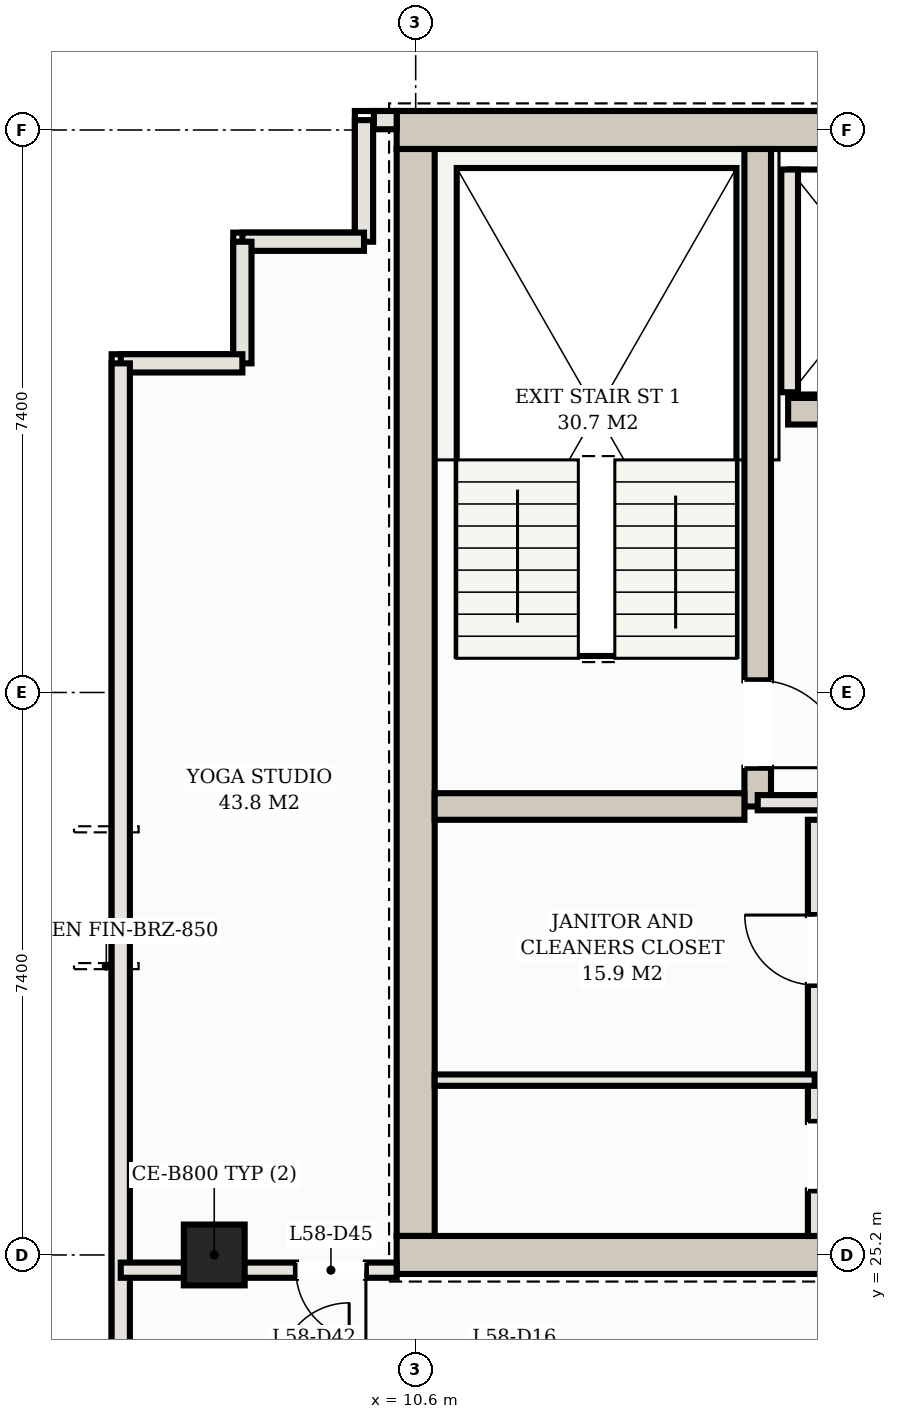
"""IFC4 building model, lengths in metres.
Left out: names, types, materials, properties, quantities, classifications, styles, units other than length and angle.
Written with IfcOpenShell. Run it as: python <this file> out.ifc"""

import sys

from ifc_helpers import new_model, si_unit, direction, frame, frame_2d, origin, origin_2d, place, context, subcontext, project, spatial, rectangle, hollow_rectangle, extrude, element, fill, save


model = new_model("IFC4")
c1 = context("Model", 3, precision=1e-05, world=origin(), true_north=direction((0.0, 1.0)))
c2 = subcontext(c1, "Body", "Model", "MODEL_VIEW")
j1 = project(units=[si_unit("LENGTHUNIT", "METRE"), si_unit("PLANEANGLEUNIT", "RADIAN")], contexts=[c1])
p1 = place(None, origin())
s1 = spatial("IfcSite", under=j1, at=p1, CompositionType="ELEMENT")
p2 = place(p1, origin())
s2 = spatial("IfcBuilding", under=s1, at=p2, CompositionType="ELEMENT")
p3 = place(p2, frame((0.0, 0.0, 213.2)))
s3 = spatial("IfcBuildingStorey", under=s2, at=p3, CompositionType="ELEMENT", Elevation=213.2)
p4 = place(p3, frame((10.35, 40.0, 0.0), z_axis=(0.0, 0.0, 1.0), x_axis=(1.0, 0.0, 0.0)))
e1 = element("IfcWall", 1, at=p4, inside=s3, PredefinedType="SHEAR", context=c2, shape_type="SweptSolid", body=[
    extrude(rectangle(XDim=32.3, YDim=0.5, at=frame_2d((16.15, 0.0))), origin(), (0.0, 0.0, 1.0), 3.11),
])
p5 = place(p3, frame((10.6, 25.45, 0.0), z_axis=(0.0, 0.0, 1.0), x_axis=(0.0, 1.0, 0.0)))
e2 = element("IfcWall", 2, at=p5, inside=s3, PredefinedType="SHEAR", context=c2, shape_type="SweptSolid", body=[
    extrude(rectangle(XDim=14.3, YDim=0.5, at=frame_2d((7.15, 0.0))), origin(), (0.0, 0.0, 1.0), 3.11),
])
p6 = place(p3, frame((10.35, 25.2, 0.0), z_axis=(0.0, 0.0, 1.0), x_axis=(1.0, 0.0, 0.0)))
e3 = element("IfcWall", 3, at=p6, inside=s3, PredefinedType="SHEAR", context=c2, shape_type="SweptSolid", body=[
    extrude(rectangle(XDim=8.05, YDim=0.5, at=frame_2d((4.025, 0.0))), origin(), (0.0, 0.0, 1.0), 3.11),
])
p7 = place(p6, frame((6.15, 0.0, 0.0)))
e4 = element("IfcOpeningElement", 4, at=p7, cuts=e3, PredefinedType="OPENING", context=c2, shape_type="SweptSolid", body=[
    extrude(rectangle(XDim=1.25, YDim=2.2, at=frame_2d((0.625, 1.1))), frame((0.0, 0.26, 0.0), z_axis=(0.0, -1.0, 0.0), x_axis=(1.0, 0.0, 0.0)), (0.0, 0.0, 1.0), 0.52),
])
p8 = place(p3, frame((15.1, 31.1, 0.0), z_axis=(0.0, 0.0, 1.0), x_axis=(0.0, 1.0, 0.0)))
e5 = element("IfcWall", 5, at=p8, inside=s3, PredefinedType="SHEAR", context=c2, shape_type="SweptSolid", body=[
    extrude(rectangle(XDim=8.65, YDim=0.35, at=frame_2d((4.325, 0.0))), origin(), (0.0, 0.0, 1.0), 3.11),
])
p9 = place(p8, frame((0.51, 0.0, 0.0)))
e6 = element("IfcOpeningElement", 6, at=p9, cuts=e5, PredefinedType="OPENING", context=c2, shape_type="SweptSolid", body=[
    extrude(rectangle(XDim=1.15, YDim=2.2, at=frame_2d((0.575, 1.1))), frame((0.0, 0.185, 0.0), z_axis=(0.0, -1.0, 0.0), x_axis=(1.0, 0.0, 0.0)), (0.0, 0.0, 1.0), 0.37),
])
p10 = place(p3, frame((10.85, 31.1, 0.0), z_axis=(0.0, 0.0, 1.0), x_axis=(1.0, 0.0, 0.0)))
e7 = element("IfcWall", 7, at=p10, inside=s3, PredefinedType="SHEAR", context=c2, shape_type="SweptSolid", body=[
    extrude(rectangle(XDim=4.075, YDim=0.35, at=frame_2d((2.038, 0.0))), origin(), (0.0, 0.0, 1.0), 3.11),
])
p11 = place(p3, frame((15.5, 36.3, 0.0), z_axis=(0.0, 0.0, 1.0), x_axis=(1.0, 0.0, 0.0)))
e8 = element("IfcWall", 8, at=p11, inside=s3, PredefinedType="SHEAR", context=c2, shape_type="SweptSolid", body=[
    extrude(rectangle(XDim=22.0, YDim=0.35, at=frame_2d((11.0, 0.0))), origin(), (0.0, 0.0, 1.0), 3.11),
])
p12 = place(p11, frame((0.65, 0.0, 0.0)))
e9 = element("IfcOpeningElement", 9, at=p12, cuts=e8, PredefinedType="OPENING", context=c2, shape_type="SweptSolid", body=[
    extrude(rectangle(XDim=1.1, YDim=2.15, at=frame_2d((0.55, 1.075))), frame((0.0, 0.185, 0.0), z_axis=(0.0, -1.0, 0.0), x_axis=(1.0, 0.0, 0.0)), (0.0, 0.0, 1.0), 0.37),
])
p13 = place(p11, frame((20.25, 0.0, 0.0)))
e10 = element("IfcOpeningElement", 10, at=p13, cuts=e8, PredefinedType="OPENING", context=c2, shape_type="SweptSolid", body=[
    extrude(rectangle(XDim=1.1, YDim=2.15, at=frame_2d((0.55, 1.075))), frame((0.0, 0.185, 0.0), z_axis=(0.0, -1.0, 0.0), x_axis=(1.0, 0.0, 0.0)), (0.0, 0.0, 1.0), 0.37),
])
p14 = place(p11, frame((17.05, 0.0, 0.0)))
e11 = element("IfcOpeningElement", 11, at=p14, cuts=e8, PredefinedType="OPENING", context=c2, shape_type="SweptSolid", body=[
    extrude(rectangle(XDim=1.3, YDim=2.2, at=frame_2d((0.65, 1.1))), frame((0.0, 0.185, 0.0), z_axis=(0.0, -1.0, 0.0), x_axis=(1.0, 0.0, 0.0)), (0.0, 0.0, 1.0), 0.37),
])
p15 = place(p11, frame((3.95, 0.0, 0.0)))
e12 = element("IfcOpeningElement", 12, at=p15, cuts=e8, PredefinedType="OPENING", context=c2, shape_type="SweptSolid", body=[
    extrude(rectangle(XDim=1.1, YDim=2.15, at=frame_2d((0.55, 1.075))), frame((0.0, 0.185, 0.0), z_axis=(0.0, -1.0, 0.0), x_axis=(1.0, 0.0, 0.0)), (0.0, 0.0, 1.0), 0.37),
])
p16 = place(p11, frame((6.55, 0.0, 0.0)))
e13 = element("IfcOpeningElement", 13, at=p16, cuts=e8, PredefinedType="OPENING", context=c2, shape_type="SweptSolid", body=[
    extrude(rectangle(XDim=1.1, YDim=2.15, at=frame_2d((0.55, 1.075))), frame((0.0, 0.185, 0.0), z_axis=(0.0, -1.0, 0.0), x_axis=(1.0, 0.0, 0.0)), (0.0, 0.0, 1.0), 0.37),
])
p17 = place(p11, frame((9.15, 0.0, 0.0)))
e14 = element("IfcOpeningElement", 14, at=p17, cuts=e8, PredefinedType="OPENING", context=c2, shape_type="SweptSolid", body=[
    extrude(rectangle(XDim=1.1, YDim=2.15, at=frame_2d((0.55, 1.075))), frame((0.0, 0.185, 0.0), z_axis=(0.0, -1.0, 0.0), x_axis=(1.0, 0.0, 0.0)), (0.0, 0.0, 1.0), 0.37),
])
p18 = place(p3, frame((7.95, 25.2, 0.0), z_axis=(0.0, 0.0, 1.0), x_axis=(1.0, 0.0, 0.0)))
e15 = element("IfcColumn", 15, at=p18, inside=s3, PredefinedType="COLUMN", context=c2, shape_type="SweptSolid", body=[
    extrude(hollow_rectangle(XDim=0.8, YDim=0.8, WallThickness=0.028, at=origin_2d()), origin(), (0.0, 0.0, 1.0), 3.3),
])
p19 = place(p3, frame((15.52, 36.55, 0.0), z_axis=(0.0, 0.0, 1.0), x_axis=(0.0, 1.0, 0.0)))
e16 = element("IfcWall", 16, at=p19, inside=s3, PredefinedType="SOLIDWALL", context=c2, shape_type="SweptSolid", body=[
    extrude(rectangle(XDim=2.93, YDim=0.22, at=frame_2d((1.465, 0.0))), origin(), (0.0, 0.0, 1.0), 3.11),
])
p20 = place(p3, frame((10.35, 40.13, 0.0), z_axis=(0.0, 0.0, 1.0), x_axis=(-1.0, 0.0, 0.0)))
e17 = element("IfcWall", 17, at=p20, inside=s3, PredefinedType="SOLIDWALL", context=c2, shape_type="SweptSolid", body=[
    extrude(rectangle(XDim=0.3, YDim=0.24, at=frame_2d((0.15, 0.0))), origin(), (0.0, 0.0, 1.0), 3.11),
])
for number, where, z_axis, x_axis in (
    (18, (9.92, 40.13, 0.0), (0.0, 0.0, 1.0), (0.0, -1.0, 0.0)),
    (19, (9.92, 38.53, 0.0), (0.0, 0.0, 1.0), (-1.0, 0.0, 0.0)),
):
    element("IfcWall", number, at=place(p3, frame(where, z_axis=z_axis, x_axis=x_axis)), inside=s3, PredefinedType="SOLIDWALL", context=c2, shape_type="SweptSolid", body=[
        extrude(rectangle(XDim=1.6, YDim=0.24, at=frame_2d((0.8, 0.0))), origin(), (0.0, 0.0, 1.0), 3.11),
    ])
for number, where, z_axis, x_axis in (
    (20, (8.32, 38.53, 0.0), (0.0, 0.0, 1.0), (0.0, -1.0, 0.0)),
    (21, (8.32, 36.93, 0.0), (0.0, 0.0, 1.0), (-1.0, 0.0, 0.0)),
):
    element("IfcWall", number, at=place(p3, frame(where, z_axis=z_axis, x_axis=x_axis)), inside=s3, PredefinedType="SOLIDWALL", context=c2, shape_type="SweptSolid", body=[
        extrude(rectangle(XDim=1.6, YDim=0.24, at=frame_2d((0.8, 0.0))), origin(), (0.0, 0.0, 1.0), 3.11),
    ])
p21 = place(p3, frame((6.72, 36.93, 0.0), z_axis=(0.0, 0.0, 1.0), x_axis=(0.0, -1.0, 0.0)))
e22 = element("IfcWall", 22, at=p21, inside=s3, PredefinedType="SOLIDWALL", context=c2, shape_type="SweptSolid", body=[
    extrude(rectangle(XDim=26.41, YDim=0.24, at=frame_2d((13.205, 0.0))), origin(), (0.0, 0.0, 1.0), 3.11),
])
p22 = place(p21, frame((18.13, 0.0, 0.0)))
e23 = element("IfcOpeningElement", 23, at=p22, cuts=e22, PredefinedType="OPENING", context=c2, shape_type="SweptSolid", body=[
    extrude(rectangle(XDim=1.8, YDim=2.2, at=frame_2d((0.9, 1.1))), frame((0.0, 0.13, 0.0), z_axis=(0.0, -1.0, 0.0), x_axis=(1.0, 0.0, 0.0)), (0.0, 0.0, 1.0), 0.26),
])
p23 = place(p3, frame((15.1, 31.15, 0.0), z_axis=(0.0, 0.0, 1.0), x_axis=(1.0, 0.0, 0.0)))
e24 = element("IfcWall", 24, at=p23, inside=s3, PredefinedType="PARTITIONING", context=c2, shape_type="SweptSolid", body=[
    extrude(rectangle(XDim=3.25, YDim=0.2, at=frame_2d((1.625, 0.0))), origin(), (0.0, 0.0, 1.0), 2.43),
])
p24 = place(p23, frame((1.275, 0.0, 0.0)))
e25 = element("IfcOpeningElement", 25, at=p24, cuts=e24, PredefinedType="OPENING", context=c2, shape_type="SweptSolid", body=[
    extrude(rectangle(XDim=1.25, YDim=2.2, at=frame_2d((0.625, 1.1))), frame((0.0, 0.11, 0.0), z_axis=(0.0, -1.0, 0.0), x_axis=(1.0, 0.0, 0.0)), (0.0, 0.0, 1.0), 0.22),
])
p25 = place(p3, frame((15.85, 25.45, 0.0), z_axis=(0.0, 0.0, 1.0), x_axis=(0.0, 1.0, 0.0)))
e26 = element("IfcWall", 26, at=p25, inside=s3, PredefinedType="PARTITIONING", context=c2, shape_type="SweptSolid", body=[
    extrude(rectangle(XDim=5.475, YDim=0.18, at=frame_2d((2.738, 0.0))), origin(), (0.0, 0.0, 1.0), 2.43),
])
p26 = place(p25, frame((0.6, 0.0, 0.0)))
e27 = element("IfcOpeningElement", 27, at=p26, cuts=e26, PredefinedType="OPENING", context=c2, shape_type="SweptSolid", body=[
    extrude(rectangle(XDim=0.9, YDim=2.15, at=frame_2d((0.45, 1.075))), frame((0.0, 0.1, 0.0), z_axis=(0.0, -1.0, 0.0), x_axis=(1.0, 0.0, 0.0)), (0.0, 0.0, 1.0), 0.2),
])
p27 = place(p25, frame((3.302, 0.0, 0.0)))
e28 = element("IfcOpeningElement", 28, at=p27, cuts=e26, PredefinedType="OPENING", context=c2, shape_type="SweptSolid", body=[
    extrude(rectangle(XDim=0.92, YDim=2.15, at=frame_2d((0.46, 1.075))), frame((0.0, 0.1, 0.0), z_axis=(0.0, -1.0, 0.0), x_axis=(1.0, 0.0, 0.0)), (0.0, 0.0, 1.0), 0.2),
])
p28 = place(p3, frame((10.85, 27.5, 0.0), z_axis=(0.0, 0.0, 1.0), x_axis=(1.0, 0.0, 0.0)))
e29 = element("IfcWall", 29, at=p28, inside=s3, PredefinedType="PARTITIONING", context=c2, shape_type="SweptSolid", body=[
    extrude(rectangle(XDim=5.0, YDim=0.15, at=frame_2d((2.5, 0.0))), origin(), (0.0, 0.0, 1.0), 2.43),
])
p29 = place(p3, frame((6.72, 25.0, 0.0), z_axis=(0.0, 0.0, 1.0), x_axis=(1.0, 0.0, 0.0)))
e30 = element("IfcWall", 30, at=p29, inside=s3, PredefinedType="PARTITIONING", context=c2, shape_type="SweptSolid", body=[
    extrude(rectangle(XDim=3.63, YDim=0.2, at=frame_2d((1.815, 0.0))), origin(), (0.0, 0.0, 1.0), 2.43),
])
p30 = place(p29, frame((2.305, 0.0, 0.0)))
e31 = element("IfcOpeningElement", 31, at=p30, cuts=e30, PredefinedType="OPENING", context=c2, shape_type="SweptSolid", body=[
    extrude(rectangle(XDim=0.92, YDim=2.15, at=frame_2d((0.46, 1.075))), frame((0.0, 0.11, 0.0), z_axis=(0.0, -1.0, 0.0), x_axis=(1.0, 0.0, 0.0)), (0.0, 0.0, 1.0), 0.22),
])
p31 = place(p9, frame((1.15, 0.0, 0.0), z_axis=(0.0, 0.0, 1.0), x_axis=(-1.0, 0.0, 0.0)))
e32 = element("IfcDoor", 32, at=p31, inside=s3, OperationType="SINGLE_SWING_RIGHT", PredefinedType="DOOR", context=c2, shape_type="SweptSolid", body=[
    extrude(rectangle(XDim=1.15, YDim=2.2, at=frame_2d((0.575, 1.1))), frame((0.0, 0.025, 0.0), z_axis=(0.0, -1.0, 0.0), x_axis=(1.0, 0.0, 0.0)), (0.0, 0.0, 1.0), 0.05),
])
fill(e6, e32)
p32 = place(p26, frame((0.9, 0.0, 0.0), z_axis=(0.0, 0.0, 1.0), x_axis=(-1.0, 0.0, 0.0)))
e33 = element("IfcDoor", 33, at=p32, inside=s3, OperationType="SINGLE_SWING_RIGHT", PredefinedType="DOOR", context=c2, shape_type="SweptSolid", body=[
    extrude(rectangle(XDim=0.9, YDim=2.15, at=frame_2d((0.45, 1.075))), frame((0.0, 0.025, 0.0), z_axis=(0.0, -1.0, 0.0), x_axis=(1.0, 0.0, 0.0)), (0.0, 0.0, 1.0), 0.05),
])
fill(e27, e33)
p33 = place(p27, origin())
e34 = element("IfcDoor", 34, at=p33, inside=s3, OperationType="SINGLE_SWING_RIGHT", PredefinedType="DOOR", context=c2, shape_type="SweptSolid", body=[
    extrude(rectangle(XDim=0.92, YDim=2.15, at=frame_2d((0.46, 1.075))), frame((0.0, 0.025, 0.0), z_axis=(0.0, -1.0, 0.0), x_axis=(1.0, 0.0, 0.0)), (0.0, 0.0, 1.0), 0.05),
])
fill(e28, e34)
p34 = place(p30, frame((0.92, 0.0, 0.0), z_axis=(0.0, 0.0, 1.0), x_axis=(-1.0, 0.0, 0.0)))
e35 = element("IfcDoor", 35, at=p34, inside=s3, OperationType="SINGLE_SWING_LEFT", PredefinedType="DOOR", context=c2, shape_type="SweptSolid", body=[
    extrude(rectangle(XDim=0.92, YDim=2.15, at=frame_2d((0.46, 1.075))), frame((0.0, 0.025, 0.0), z_axis=(0.0, -1.0, 0.0), x_axis=(1.0, 0.0, 0.0)), (0.0, 0.0, 1.0), 0.05),
])
fill(e31, e35)
save(model, sys.argv[1])
